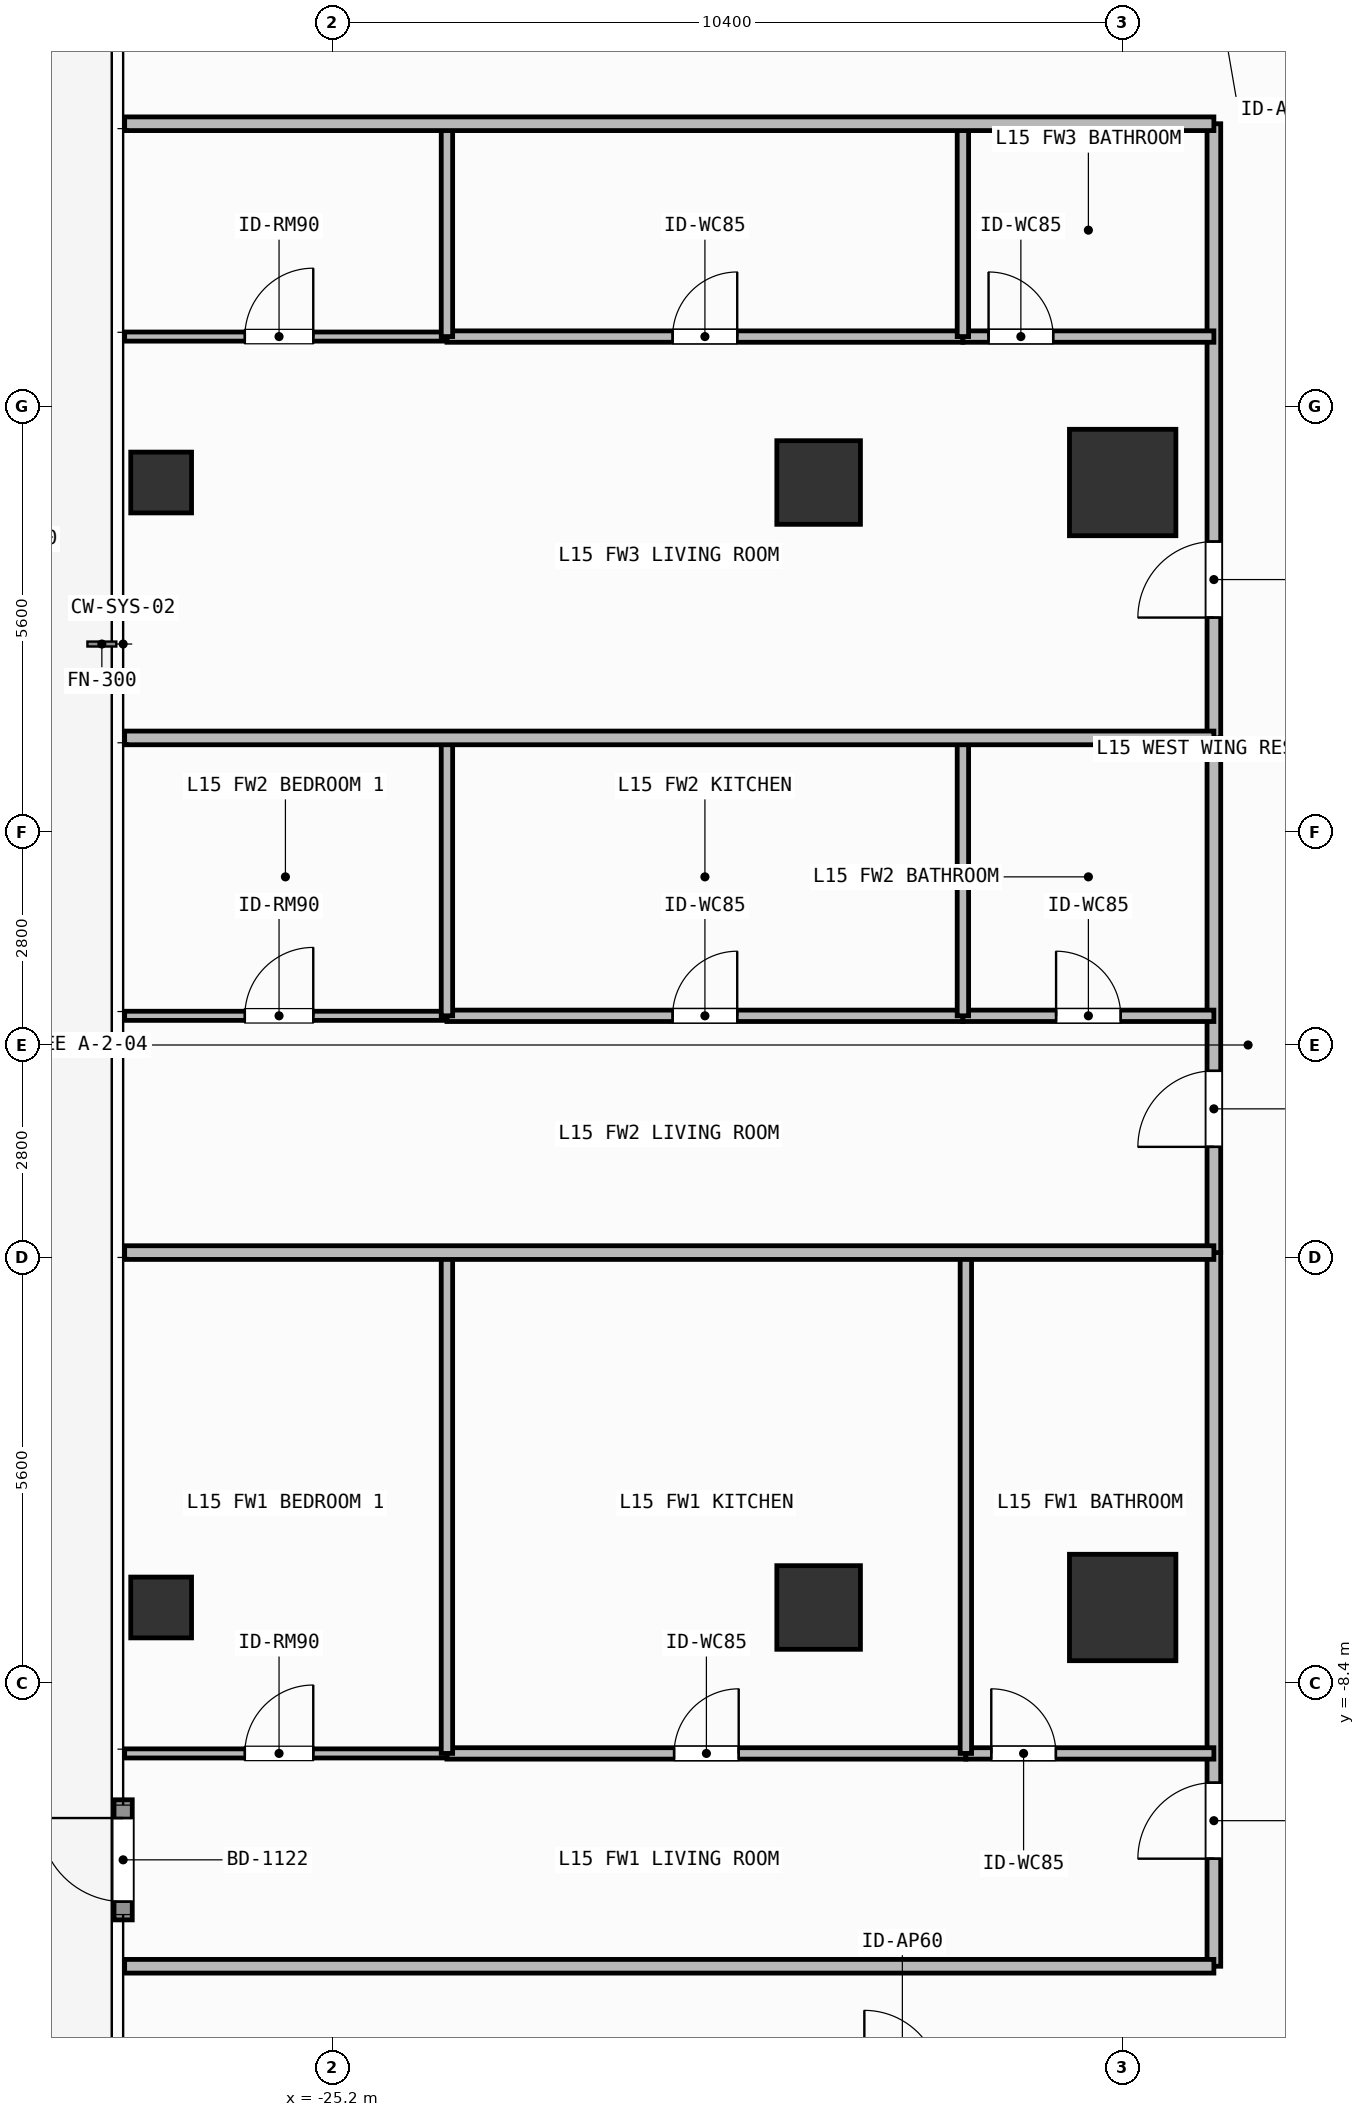
"""IFC4 building model, lengths in metres.
Left out: names, types, materials, properties, quantities, classifications, styles, units other than length and angle.
Written with IfcOpenShell. Run it as: python <this file> out.ifc"""

import sys

from ifc_helpers import new_model, si_unit, direction, frame, frame_2d, origin, origin_2d, place, context, subcontext, project, spatial, rectangle, hollow_rectangle, extrude, element, fill, save


model = new_model("IFC4")
c1 = context("Model", 3, precision=1e-05, world=origin(), true_north=direction((0.0, 1.0)))
c2 = subcontext(c1, "Body", "Model", "MODEL_VIEW")
j1 = project(units=[si_unit("LENGTHUNIT", "METRE"), si_unit("PLANEANGLEUNIT", "RADIAN")], contexts=[c1])
p1 = place(None, origin())
s1 = spatial("IfcSite", under=j1, at=p1, CompositionType="ELEMENT")
p2 = place(p1, origin())
s2 = spatial("IfcBuilding", under=s1, at=p2, CompositionType="ELEMENT")
p3 = place(p2, frame((0.0, 0.0, 57.9)))
s3 = spatial("IfcBuildingStorey", under=s2, at=p3, CompositionType="ELEMENT", Elevation=57.9)
for number, where, z_axis, x_axis in (
    (1, (-14.8, -7.4, 0.0), (0.0, 0.0, 1.0), (1.0, 0.0, 0.0)),
    (2, (-14.8, 7.4, 0.0), (0.0, 0.0, 1.0), (1.0, 0.0, 0.0)),
):
    element("IfcColumn", number, at=place(p3, frame(where, z_axis=z_axis, x_axis=x_axis)), inside=s3, PredefinedType="COLUMN", context=c2, shape_type="SweptSolid", body=[
        extrude(rectangle(XDim=1.4, YDim=1.4, at=origin_2d()), origin(), (0.0, 0.0, 1.0), 3.9),
    ])
for number, where, z_axis, x_axis in (
    (3, (-18.8, -7.4, 0.0), (0.0, 0.0, 1.0), (1.0, 0.0, 0.0)),
    (4, (-18.8, 7.4, 0.0), (0.0, 0.0, 1.0), (1.0, 0.0, 0.0)),
):
    element("IfcColumn", number, at=place(p3, frame(where, z_axis=z_axis, x_axis=x_axis)), inside=s3, PredefinedType="COLUMN", context=c2, shape_type="SweptSolid", body=[
        extrude(rectangle(XDim=1.1, YDim=1.1, at=origin_2d()), origin(), (0.0, 0.0, 1.0), 3.9),
    ])
for number, where, z_axis, x_axis in (
    (5, (-27.45, -7.4, 0.0), (0.0, 0.0, 1.0), (1.0, 0.0, 0.0)),
    (6, (-27.45, 7.4, 0.0), (0.0, 0.0, 1.0), (1.0, 0.0, 0.0)),
):
    element("IfcColumn", number, at=place(p3, frame(where, z_axis=z_axis, x_axis=x_axis)), inside=s3, PredefinedType="COLUMN", context=c2, shape_type="SweptSolid", body=[
        extrude(hollow_rectangle(XDim=0.8, YDim=0.8, WallThickness=0.036, at=origin_2d()), origin(), (0.0, 0.0, 1.0), 3.9),
    ])
p4 = place(p3, frame((-27.95, -11.51, 0.0), z_axis=(0.0, 0.0, 1.0), x_axis=(0.0, 1.0, 0.0)))
e7 = element("IfcWall", 7, at=p4, inside=s3, PredefinedType="SOLIDWALL", context=c2, shape_type="SweptSolid", body=[
    extrude(rectangle(XDim=1.58, YDim=0.24, at=frame_2d((0.79, 0.0))), origin(), (0.0, 0.0, 1.0), 3.68),
])
p5 = place(p4, frame((0.24, 0.0, 0.0)))
e8 = element("IfcOpeningElement", 8, at=p5, cuts=e7, PredefinedType="OPENING", context=c2, shape_type="SweptSolid", body=[
    extrude(rectangle(XDim=1.1, YDim=2.2, at=frame_2d((0.55, 1.1))), frame((0.0, 0.13, 0.0), z_axis=(0.0, -1.0, 0.0), x_axis=(1.0, 0.0, 0.0)), (0.0, 0.0, 1.0), 0.26),
])
p6 = place(p3, frame((-13.6, -12.12, 0.0), z_axis=(0.0, 0.0, 1.0), x_axis=(0.0, 1.0, 0.0)))
e9 = element("IfcWall", 9, at=p6, inside=s3, PredefinedType="PARTITIONING", context=c2, shape_type="SweptSolid", body=[
    extrude(rectangle(XDim=9.389, YDim=0.18, at=frame_2d((4.695, 0.0))), origin(), (0.0, 0.0, 1.0), 3.68),
])
p7 = place(p6, frame((1.415, 0.0, 0.0)))
e10 = element("IfcOpeningElement", 10, at=p7, cuts=e9, PredefinedType="OPENING", context=c2, shape_type="SweptSolid", body=[
    extrude(rectangle(XDim=1.0, YDim=2.2, at=frame_2d((0.5, 1.1))), frame((0.0, 0.1, 0.0), z_axis=(0.0, -1.0, 0.0), x_axis=(1.0, 0.0, 0.0)), (0.0, 0.0, 1.0), 0.2),
])
p8 = place(p3, frame((-23.69, -9.32, 0.0), z_axis=(0.0, 0.0, 1.0), x_axis=(1.0, 0.0, 0.0)))
e11 = element("IfcWall", 11, at=p8, inside=s3, PredefinedType="PARTITIONING", context=c2, shape_type="SweptSolid", body=[
    extrude(rectangle(XDim=6.827, YDim=0.15, at=frame_2d((3.414, 0.0))), origin(), (0.0, 0.0, 1.0), 3.68),
])
p9 = place(p8, frame((2.989, 0.0, 0.0)))
e12 = element("IfcOpeningElement", 12, at=p9, cuts=e11, PredefinedType="OPENING", context=c2, shape_type="SweptSolid", body=[
    extrude(rectangle(XDim=0.85, YDim=2.1, at=frame_2d((0.425, 1.05))), frame((0.0, 0.085, 0.0), z_axis=(0.0, -1.0, 0.0), x_axis=(1.0, 0.0, 0.0)), (0.0, 0.0, 1.0), 0.17),
])
p10 = place(p3, frame((-16.863, -9.32, 0.0), z_axis=(0.0, 0.0, 1.0), x_axis=(1.0, 0.0, 0.0)))
e13 = element("IfcWall", 13, at=p10, inside=s3, PredefinedType="PARTITIONING", context=c2, shape_type="SweptSolid", body=[
    extrude(rectangle(XDim=3.263, YDim=0.15, at=frame_2d((1.631, 0.0))), origin(), (0.0, 0.0, 1.0), 3.68),
])
p11 = place(p10, frame((0.334, 0.0, 0.0)))
e14 = element("IfcOpeningElement", 14, at=p11, cuts=e13, PredefinedType="OPENING", context=c2, shape_type="SweptSolid", body=[
    extrude(rectangle(XDim=0.85, YDim=2.1, at=frame_2d((0.425, 1.05))), frame((0.0, 0.085, 0.0), z_axis=(0.0, -1.0, 0.0), x_axis=(1.0, 0.0, 0.0)), (0.0, 0.0, 1.0), 0.17),
])
p12 = place(p3, frame((-27.93, -9.32, 0.0), z_axis=(0.0, 0.0, 1.0), x_axis=(1.0, 0.0, 0.0)))
e15 = element("IfcWall", 15, at=p12, inside=s3, PredefinedType="PARTITIONING", context=c2, shape_type="SweptSolid", body=[
    extrude(rectangle(XDim=4.24, YDim=0.12, at=frame_2d((2.12, 0.0))), origin(), (0.0, 0.0, 1.0), 3.68),
])
p13 = place(p12, frame((1.581, 0.0, 0.0)))
e16 = element("IfcOpeningElement", 16, at=p13, cuts=e15, PredefinedType="OPENING", context=c2, shape_type="SweptSolid", body=[
    extrude(rectangle(XDim=0.9, YDim=2.1, at=frame_2d((0.45, 1.05))), frame((0.0, 0.07, 0.0), z_axis=(0.0, -1.0, 0.0), x_axis=(1.0, 0.0, 0.0)), (0.0, 0.0, 1.0), 0.14),
])
p14 = place(p3, frame((-13.6, -2.731, 0.0), z_axis=(0.0, 0.0, 1.0), x_axis=(0.0, 1.0, 0.0)))
e17 = element("IfcWall", 17, at=p14, inside=s3, PredefinedType="PARTITIONING", context=c2, shape_type="SweptSolid", body=[
    extrude(rectangle(XDim=6.771, YDim=0.18, at=frame_2d((3.385, 0.0))), origin(), (0.0, 0.0, 1.0), 3.68),
])
p15 = place(p14, frame((1.391, 0.0, 0.0)))
e18 = element("IfcOpeningElement", 18, at=p15, cuts=e17, PredefinedType="OPENING", context=c2, shape_type="SweptSolid", body=[
    extrude(rectangle(XDim=1.0, YDim=2.2, at=frame_2d((0.5, 1.1))), frame((0.0, 0.1, 0.0), z_axis=(0.0, -1.0, 0.0), x_axis=(1.0, 0.0, 0.0)), (0.0, 0.0, 1.0), 0.2),
])
p16 = place(p3, frame((-23.69, 0.384, 0.0), z_axis=(0.0, 0.0, 1.0), x_axis=(1.0, 0.0, 0.0)))
e19 = element("IfcWall", 19, at=p16, inside=s3, PredefinedType="PARTITIONING", context=c2, shape_type="SweptSolid", body=[
    extrude(rectangle(XDim=6.788, YDim=0.15, at=frame_2d((3.394, 0.0))), origin(), (0.0, 0.0, 1.0), 3.68),
])
p17 = place(p16, frame((2.969, 0.0, 0.0)))
e20 = element("IfcOpeningElement", 20, at=p17, cuts=e19, PredefinedType="OPENING", context=c2, shape_type="SweptSolid", body=[
    extrude(rectangle(XDim=0.85, YDim=2.1, at=frame_2d((0.425, 1.05))), frame((0.0, 0.085, 0.0), z_axis=(0.0, -1.0, 0.0), x_axis=(1.0, 0.0, 0.0)), (0.0, 0.0, 1.0), 0.17),
])
p18 = place(p3, frame((-16.902, 0.384, 0.0), z_axis=(0.0, 0.0, 1.0), x_axis=(1.0, 0.0, 0.0)))
e21 = element("IfcWall", 21, at=p18, inside=s3, PredefinedType="PARTITIONING", context=c2, shape_type="SweptSolid", body=[
    extrude(rectangle(XDim=3.302, YDim=0.15, at=frame_2d((1.651, 0.0))), origin(), (0.0, 0.0, 1.0), 3.68),
])
p19 = place(p18, frame((1.226, 0.0, 0.0)))
e22 = element("IfcOpeningElement", 22, at=p19, cuts=e21, PredefinedType="OPENING", context=c2, shape_type="SweptSolid", body=[
    extrude(rectangle(XDim=0.85, YDim=2.1, at=frame_2d((0.425, 1.05))), frame((0.0, 0.085, 0.0), z_axis=(0.0, -1.0, 0.0), x_axis=(1.0, 0.0, 0.0)), (0.0, 0.0, 1.0), 0.17),
])
p20 = place(p3, frame((-27.93, 0.384, 0.0), z_axis=(0.0, 0.0, 1.0), x_axis=(1.0, 0.0, 0.0)))
e23 = element("IfcWall", 23, at=p20, inside=s3, PredefinedType="PARTITIONING", context=c2, shape_type="SweptSolid", body=[
    extrude(rectangle(XDim=4.24, YDim=0.12, at=frame_2d((2.12, 0.0))), origin(), (0.0, 0.0, 1.0), 3.68),
])
p21 = place(p20, frame((1.581, 0.0, 0.0)))
e24 = element("IfcOpeningElement", 24, at=p21, cuts=e23, PredefinedType="OPENING", context=c2, shape_type="SweptSolid", body=[
    extrude(rectangle(XDim=0.9, YDim=2.1, at=frame_2d((0.45, 1.05))), frame((0.0, 0.07, 0.0), z_axis=(0.0, -1.0, 0.0), x_axis=(1.0, 0.0, 0.0)), (0.0, 0.0, 1.0), 0.14),
])
p22 = place(p3, frame((-13.6, 4.04, 0.0), z_axis=(0.0, 0.0, 1.0), x_axis=(0.0, 1.0, 0.0)))
e25 = element("IfcWall", 25, at=p22, inside=s3, PredefinedType="PARTITIONING", context=c2, shape_type="SweptSolid", body=[
    extrude(rectangle(XDim=8.08, YDim=0.18, at=frame_2d((4.04, 0.0))), origin(), (0.0, 0.0, 1.0), 3.68),
])
p23 = place(p22, frame((1.583, 0.0, 0.0)))
e26 = element("IfcOpeningElement", 26, at=p23, cuts=e25, PredefinedType="OPENING", context=c2, shape_type="SweptSolid", body=[
    extrude(rectangle(XDim=1.0, YDim=2.2, at=frame_2d((0.5, 1.1))), frame((0.0, 0.1, 0.0), z_axis=(0.0, -1.0, 0.0), x_axis=(1.0, 0.0, 0.0)), (0.0, 0.0, 1.0), 0.2),
])
p24 = place(p3, frame((-23.69, 9.32, 0.0), z_axis=(0.0, 0.0, 1.0), x_axis=(1.0, 0.0, 0.0)))
e27 = element("IfcWall", 27, at=p24, inside=s3, PredefinedType="PARTITIONING", context=c2, shape_type="SweptSolid", body=[
    extrude(rectangle(XDim=6.788, YDim=0.15, at=frame_2d((3.394, 0.0))), origin(), (0.0, 0.0, 1.0), 3.68),
])
p25 = place(p24, frame((2.969, 0.0, 0.0)))
e28 = element("IfcOpeningElement", 28, at=p25, cuts=e27, PredefinedType="OPENING", context=c2, shape_type="SweptSolid", body=[
    extrude(rectangle(XDim=0.85, YDim=2.1, at=frame_2d((0.425, 1.05))), frame((0.0, 0.085, 0.0), z_axis=(0.0, -1.0, 0.0), x_axis=(1.0, 0.0, 0.0)), (0.0, 0.0, 1.0), 0.17),
])
p26 = place(p3, frame((-16.902, 9.32, 0.0), z_axis=(0.0, 0.0, 1.0), x_axis=(1.0, 0.0, 0.0)))
e29 = element("IfcWall", 29, at=p26, inside=s3, PredefinedType="PARTITIONING", context=c2, shape_type="SweptSolid", body=[
    extrude(rectangle(XDim=3.302, YDim=0.15, at=frame_2d((1.651, 0.0))), origin(), (0.0, 0.0, 1.0), 3.68),
])
p27 = place(p26, frame((0.338, 0.0, 0.0)))
e30 = element("IfcOpeningElement", 30, at=p27, cuts=e29, PredefinedType="OPENING", context=c2, shape_type="SweptSolid", body=[
    extrude(rectangle(XDim=0.85, YDim=2.1, at=frame_2d((0.425, 1.05))), frame((0.0, 0.085, 0.0), z_axis=(0.0, -1.0, 0.0), x_axis=(1.0, 0.0, 0.0)), (0.0, 0.0, 1.0), 0.17),
])
p28 = place(p3, frame((-27.93, 9.32, 0.0), z_axis=(0.0, 0.0, 1.0), x_axis=(1.0, 0.0, 0.0)))
e31 = element("IfcWall", 31, at=p28, inside=s3, PredefinedType="PARTITIONING", context=c2, shape_type="SweptSolid", body=[
    extrude(rectangle(XDim=4.24, YDim=0.12, at=frame_2d((2.12, 0.0))), origin(), (0.0, 0.0, 1.0), 3.68),
])
p29 = place(p28, frame((1.581, 0.0, 0.0)))
e32 = element("IfcOpeningElement", 32, at=p29, cuts=e31, PredefinedType="OPENING", context=c2, shape_type="SweptSolid", body=[
    extrude(rectangle(XDim=0.9, YDim=2.1, at=frame_2d((0.45, 1.05))), frame((0.0, 0.07, 0.0), z_axis=(0.0, -1.0, 0.0), x_axis=(1.0, 0.0, 0.0)), (0.0, 0.0, 1.0), 0.14),
])
for number, where, z_axis, x_axis in (
    (33, (-16.863, -9.32, 0.0), (0.0, 0.0, 1.0), (0.0, 1.0, 0.0)),
    (34, (-23.69, -9.32, 0.0), (0.0, 0.0, 1.0), (0.0, 1.0, 0.0)),
):
    element("IfcWall", number, at=place(p3, frame(where, z_axis=z_axis, x_axis=x_axis)), inside=s3, PredefinedType="PARTITIONING", context=c2, shape_type="SweptSolid", body=[
        extrude(rectangle(XDim=6.589, YDim=0.15, at=frame_2d((3.294, 0.0))), origin(), (0.0, 0.0, 1.0), 3.68),
    ])
for number, where, z_axis, x_axis in (
    (35, (-16.902, 0.384, 0.0), (0.0, 0.0, 1.0), (0.0, 1.0, 0.0)),
    (36, (-23.69, 0.384, 0.0), (0.0, 0.0, 1.0), (0.0, 1.0, 0.0)),
):
    element("IfcWall", number, at=place(p3, frame(where, z_axis=z_axis, x_axis=x_axis)), inside=s3, PredefinedType="PARTITIONING", context=c2, shape_type="SweptSolid", body=[
        extrude(rectangle(XDim=3.656, YDim=0.15, at=frame_2d((1.828, 0.0))), origin(), (0.0, 0.0, 1.0), 3.68),
    ])
p30 = place(p3, frame((-27.93, -2.731, 0.0), z_axis=(0.0, 0.0, 1.0), x_axis=(1.0, 0.0, 0.0)))
e37 = element("IfcWall", 37, at=p30, inside=s3, PredefinedType="PARTITIONING", context=c2, shape_type="SweptSolid", body=[
    extrude(rectangle(XDim=14.33, YDim=0.18, at=frame_2d((7.165, 0.0))), origin(), (0.0, 0.0, 1.0), 3.68),
])
for number, where, z_axis, x_axis in (
    (38, (-16.902, 9.32, 0.0), (0.0, 0.0, 1.0), (0.0, 1.0, 0.0)),
    (39, (-23.69, 9.32, 0.0), (0.0, 0.0, 1.0), (0.0, 1.0, 0.0)),
):
    element("IfcWall", number, at=place(p3, frame(where, z_axis=z_axis, x_axis=x_axis)), inside=s3, PredefinedType="PARTITIONING", context=c2, shape_type="SweptSolid", body=[
        extrude(rectangle(XDim=2.8, YDim=0.15, at=frame_2d((1.4, 0.0))), origin(), (0.0, 0.0, 1.0), 3.68),
    ])
for number, where, z_axis, x_axis in (
    (40, (-27.93, 4.04, 0.0), (0.0, 0.0, 1.0), (1.0, 0.0, 0.0)),
    (41, (-27.93, -12.12, 0.0), (0.0, 0.0, 1.0), (1.0, 0.0, 0.0)),
    (42, (-27.93, 12.12, 0.0), (0.0, 0.0, 1.0), (1.0, 0.0, 0.0)),
):
    element("IfcWall", number, at=place(p3, frame(where, z_axis=z_axis, x_axis=x_axis)), inside=s3, PredefinedType="PARTITIONING", context=c2, shape_type="SweptSolid", body=[
        extrude(rectangle(XDim=14.33, YDim=0.18, at=frame_2d((7.165, 0.0))), origin(), (0.0, 0.0, 1.0), 3.68),
    ])
p31 = place(p5, origin())
e43 = element("IfcDoor", 43, at=p31, inside=s3, OperationType="SINGLE_SWING_RIGHT", PredefinedType="DOOR", context=c2, shape_type="SweptSolid", body=[
    extrude(rectangle(XDim=1.1, YDim=2.2, at=frame_2d((0.55, 1.1))), frame((0.0, 0.025, 0.0), z_axis=(0.0, -1.0, 0.0), x_axis=(1.0, 0.0, 0.0)), (0.0, 0.0, 1.0), 0.05),
])
fill(e8, e43)
p32 = place(p7, origin())
e44 = element("IfcDoor", 44, at=p32, inside=s3, OperationType="SINGLE_SWING_LEFT", PredefinedType="DOOR", context=c2, shape_type="SweptSolid", body=[
    extrude(rectangle(XDim=1.0, YDim=2.2, at=frame_2d((0.5, 1.1))), frame((0.0, 0.025, 0.0), z_axis=(0.0, -1.0, 0.0), x_axis=(1.0, 0.0, 0.0)), (0.0, 0.0, 1.0), 0.05),
])
fill(e10, e44)
p33 = place(p9, origin())
e45 = element("IfcDoor", 45, at=p33, inside=s3, OperationType="SINGLE_SWING_RIGHT", PredefinedType="DOOR", context=c2, shape_type="SweptSolid", body=[
    extrude(rectangle(XDim=0.85, YDim=2.1, at=frame_2d((0.425, 1.05))), frame((0.0, 0.025, 0.0), z_axis=(0.0, -1.0, 0.0), x_axis=(1.0, 0.0, 0.0)), (0.0, 0.0, 1.0), 0.05),
])
fill(e12, e45)
p34 = place(p11, origin())
e46 = element("IfcDoor", 46, at=p34, inside=s3, OperationType="SINGLE_SWING_LEFT", PredefinedType="DOOR", context=c2, shape_type="SweptSolid", body=[
    extrude(rectangle(XDim=0.85, YDim=2.1, at=frame_2d((0.425, 1.05))), frame((0.0, 0.025, 0.0), z_axis=(0.0, -1.0, 0.0), x_axis=(1.0, 0.0, 0.0)), (0.0, 0.0, 1.0), 0.05),
])
fill(e14, e46)
p35 = place(p13, origin())
e47 = element("IfcDoor", 47, at=p35, inside=s3, OperationType="SINGLE_SWING_RIGHT", PredefinedType="DOOR", context=c2, shape_type="SweptSolid", body=[
    extrude(rectangle(XDim=0.9, YDim=2.1, at=frame_2d((0.45, 1.05))), frame((0.0, 0.025, 0.0), z_axis=(0.0, -1.0, 0.0), x_axis=(1.0, 0.0, 0.0)), (0.0, 0.0, 1.0), 0.05),
])
fill(e16, e47)
p36 = place(p15, origin())
e48 = element("IfcDoor", 48, at=p36, inside=s3, OperationType="SINGLE_SWING_LEFT", PredefinedType="DOOR", context=c2, shape_type="SweptSolid", body=[
    extrude(rectangle(XDim=1.0, YDim=2.2, at=frame_2d((0.5, 1.1))), frame((0.0, 0.025, 0.0), z_axis=(0.0, -1.0, 0.0), x_axis=(1.0, 0.0, 0.0)), (0.0, 0.0, 1.0), 0.05),
])
fill(e18, e48)
p37 = place(p17, origin())
e49 = element("IfcDoor", 49, at=p37, inside=s3, OperationType="SINGLE_SWING_RIGHT", PredefinedType="DOOR", context=c2, shape_type="SweptSolid", body=[
    extrude(rectangle(XDim=0.85, YDim=2.1, at=frame_2d((0.425, 1.05))), frame((0.0, 0.025, 0.0), z_axis=(0.0, -1.0, 0.0), x_axis=(1.0, 0.0, 0.0)), (0.0, 0.0, 1.0), 0.05),
])
fill(e20, e49)
p38 = place(p19, origin())
e50 = element("IfcDoor", 50, at=p38, inside=s3, OperationType="SINGLE_SWING_LEFT", PredefinedType="DOOR", context=c2, shape_type="SweptSolid", body=[
    extrude(rectangle(XDim=0.85, YDim=2.1, at=frame_2d((0.425, 1.05))), frame((0.0, 0.025, 0.0), z_axis=(0.0, -1.0, 0.0), x_axis=(1.0, 0.0, 0.0)), (0.0, 0.0, 1.0), 0.05),
])
fill(e22, e50)
p39 = place(p21, origin())
e51 = element("IfcDoor", 51, at=p39, inside=s3, OperationType="SINGLE_SWING_RIGHT", PredefinedType="DOOR", context=c2, shape_type="SweptSolid", body=[
    extrude(rectangle(XDim=0.9, YDim=2.1, at=frame_2d((0.45, 1.05))), frame((0.0, 0.025, 0.0), z_axis=(0.0, -1.0, 0.0), x_axis=(1.0, 0.0, 0.0)), (0.0, 0.0, 1.0), 0.05),
])
fill(e24, e51)
p40 = place(p23, origin())
e52 = element("IfcDoor", 52, at=p40, inside=s3, OperationType="SINGLE_SWING_LEFT", PredefinedType="DOOR", context=c2, shape_type="SweptSolid", body=[
    extrude(rectangle(XDim=1.0, YDim=2.2, at=frame_2d((0.5, 1.1))), frame((0.0, 0.025, 0.0), z_axis=(0.0, -1.0, 0.0), x_axis=(1.0, 0.0, 0.0)), (0.0, 0.0, 1.0), 0.05),
])
fill(e26, e52)
p41 = place(p25, origin())
e53 = element("IfcDoor", 53, at=p41, inside=s3, OperationType="SINGLE_SWING_RIGHT", PredefinedType="DOOR", context=c2, shape_type="SweptSolid", body=[
    extrude(rectangle(XDim=0.85, YDim=2.1, at=frame_2d((0.425, 1.05))), frame((0.0, 0.025, 0.0), z_axis=(0.0, -1.0, 0.0), x_axis=(1.0, 0.0, 0.0)), (0.0, 0.0, 1.0), 0.05),
])
fill(e28, e53)
p42 = place(p27, origin())
e54 = element("IfcDoor", 54, at=p42, inside=s3, OperationType="SINGLE_SWING_LEFT", PredefinedType="DOOR", context=c2, shape_type="SweptSolid", body=[
    extrude(rectangle(XDim=0.85, YDim=2.1, at=frame_2d((0.425, 1.05))), frame((0.0, 0.025, 0.0), z_axis=(0.0, -1.0, 0.0), x_axis=(1.0, 0.0, 0.0)), (0.0, 0.0, 1.0), 0.05),
])
fill(e30, e54)
p43 = place(p29, origin())
e55 = element("IfcDoor", 55, at=p43, inside=s3, OperationType="SINGLE_SWING_RIGHT", PredefinedType="DOOR", context=c2, shape_type="SweptSolid", body=[
    extrude(rectangle(XDim=0.9, YDim=2.1, at=frame_2d((0.45, 1.05))), frame((0.0, 0.025, 0.0), z_axis=(0.0, -1.0, 0.0), x_axis=(1.0, 0.0, 0.0)), (0.0, 0.0, 1.0), 0.05),
])
fill(e32, e55)
save(model, sys.argv[1])
